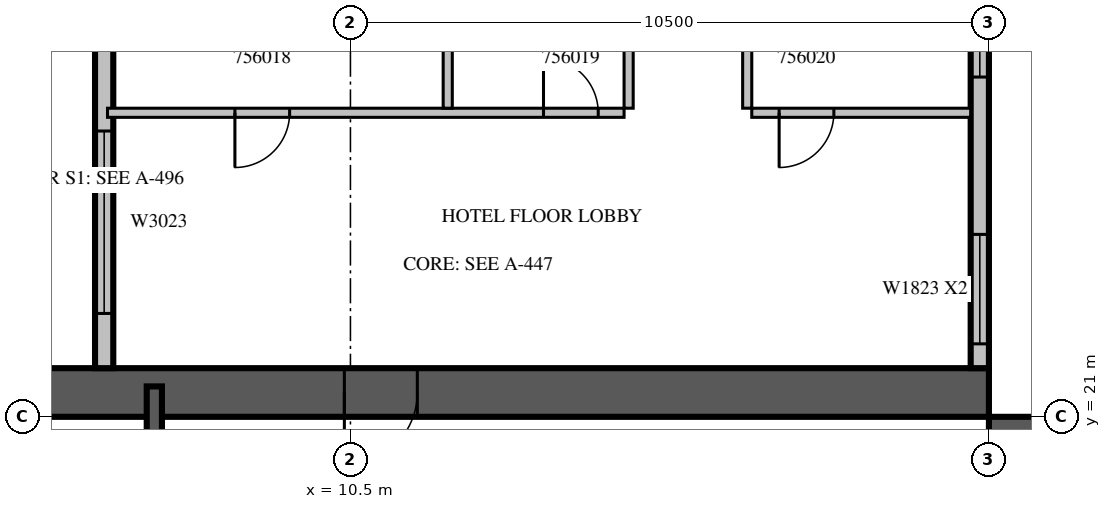
"""IFC4 building model, lengths in metres.
Left out: names, types, materials, properties, quantities, classifications, styles, units other than length and angle.
Written with IfcOpenShell. Run it as: python <this file> out.ifc"""

import sys

from ifc_helpers import new_model, si_unit, direction, frame, frame_2d, origin, place, context, subcontext, project, spatial, rectangle, extrude, source, transform, mapped, element, fill, save


model = new_model("IFC4")
c1 = context("Model", 3, precision=1e-05, world=origin(), true_north=direction((0.0, 1.0)))
c2 = subcontext(c1, "Body", "Model", "MODEL_VIEW")
j1 = project(units=[si_unit("LENGTHUNIT", "METRE"), si_unit("PLANEANGLEUNIT", "RADIAN")], contexts=[c1])
p1 = place(None, origin())
s1 = spatial("IfcSite", under=j1, at=p1, CompositionType="ELEMENT")
p2 = place(p1, origin())
s2 = spatial("IfcBuilding", under=s1, at=p2, CompositionType="ELEMENT")
p3 = place(p2, frame((0.0, 0.0, 246.2)))
s3 = spatial("IfcBuildingStorey", under=s2, at=p3, CompositionType="ELEMENT", Elevation=246.2)
m1 = source(origin(), c2, "Body", "SweptSolid", [
    extrude(rectangle(XDim=16.8, YDim=0.8, at=frame_2d((8.4, 0.0))), origin(), (0.0, 0.0, 1.0), 3.8),
])
p4 = place(p3, frame((21.4, 4.2, 0.0), z_axis=(0.0, 0.0, 1.0), x_axis=(0.0, 1.0, 0.0)))
e1 = element("IfcWall", 1, at=p4, inside=s3, PredefinedType="SHEAR", context=c2, shape_type="MappedRepresentation", body=[
    mapped(m1, transform((0.0, 0.0, 0.0), scale=1.0)),
])
m2 = source(origin(), c2, "Body", "SweptSolid", [
    extrude(rectangle(XDim=2.2, YDim=2.1, at=frame_2d((1.1, 1.05))), frame((0.0, 0.41, 0.0), z_axis=(0.0, -1.0, 0.0), x_axis=(1.0, 0.0, 0.0)), (0.0, 0.0, 1.0), 0.82),
])
p5 = place(p4, frame((4.2, 0.0, 0.0)))
e2 = element("IfcOpeningElement", 2, at=p5, cuts=e1, PredefinedType="OPENING", context=c2, shape_type="MappedRepresentation", body=[
    mapped(m2, transform((0.0, 0.0, 0.0), scale=1.0)),
])
m3 = source(origin(), c2, "Body", "SweptSolid", [
    extrude(rectangle(XDim=1.2, YDim=2.1, at=frame_2d((0.6, 1.05))), frame((0.0, 0.41, 0.0), z_axis=(0.0, -1.0, 0.0), x_axis=(1.0, 0.0, 0.0)), (0.0, 0.0, 1.0), 0.82),
])
p6 = place(p4, frame((14.7, 0.0, 0.0)))
e3 = element("IfcOpeningElement", 3, at=p6, cuts=e1, PredefinedType="OPENING", context=c2, shape_type="MappedRepresentation", body=[
    mapped(m3, transform((0.0, 0.0, 0.0), scale=1.0)),
])
p7 = place(p3, frame((4.2, 21.4, 0.0), z_axis=(0.0, 0.0, 1.0), x_axis=(1.0, 0.0, 0.0)))
e4 = element("IfcWall", 4, at=p7, inside=s3, PredefinedType="SHEAR", context=c2, shape_type="MappedRepresentation", body=[
    mapped(m1, transform((0.0, 0.0, 0.0), scale=1.0)),
])
p8 = place(p7, frame((6.2, 0.0, 0.0)))
e5 = element("IfcOpeningElement", 5, at=p8, cuts=e4, PredefinedType="OPENING", context=c2, shape_type="MappedRepresentation", body=[
    mapped(m3, transform((0.0, 0.0, 0.0), scale=1.0)),
])
m4 = source(origin(), c2, "Body", "SweptSolid", [
    extrude(rectangle(XDim=7.2, YDim=0.3, at=frame_2d((3.6, 0.0))), origin(), (0.0, 0.0, 1.0), 3.4),
])
p9 = place(p3, frame((20.85, 21.8, 0.0), z_axis=(0.0, 0.0, 1.0), x_axis=(0.0, 1.0, 0.0)))
e6 = element("IfcWall", 6, at=p9, inside=s3, PredefinedType="STANDARD", context=c2, shape_type="MappedRepresentation", body=[
    mapped(m4, transform((0.0, 0.0, 0.0), scale=1.0)),
])
m5 = source(origin(), c2, "Body", "SweptSolid", [
    extrude(rectangle(XDim=1.8, YDim=2.3, at=frame_2d((0.9, 1.15))), frame((0.0, 0.16, 0.0), z_axis=(0.0, -1.0, 0.0), x_axis=(1.0, 0.0, 0.0)), (0.0, 0.0, 1.0), 0.32),
])
p10 = place(p9, frame((0.4, 0.0, 0.6)))
e7 = element("IfcOpeningElement", 7, at=p10, cuts=e6, PredefinedType="OPENING", context=c2, shape_type="MappedRepresentation", body=[
    mapped(m5, transform((0.0, 0.0, 0.0), scale=1.0)),
])
p11 = place(p9, frame((4.787, 0.0, 0.6)))
e8 = element("IfcOpeningElement", 8, at=p11, cuts=e6, PredefinedType="OPENING", context=c2, shape_type="MappedRepresentation", body=[
    mapped(m5, transform((0.0, 0.0, 0.0), scale=1.0)),
])
m6 = source(origin(), c2, "Body", "SweptSolid", [
    extrude(rectangle(XDim=16.6, YDim=0.3, at=frame_2d((8.3, 0.0))), origin(), (0.0, 0.0, 1.0), 3.4),
])
p12 = place(p3, frame((6.45, 38.4, 0.0), z_axis=(0.0, 0.0, 1.0), x_axis=(0.0, -1.0, 0.0)))
e9 = element("IfcWall", 9, at=p12, inside=s3, PredefinedType="STANDARD", context=c2, shape_type="MappedRepresentation", body=[
    mapped(m6, transform((0.0, 0.0, 0.0), scale=1.0)),
])
p13 = place(p12, frame((1.15, 0.0, 0.6)))
e10 = element("IfcOpeningElement", 10, at=p13, cuts=e9, PredefinedType="OPENING", context=c2, shape_type="MappedRepresentation", body=[
    mapped(m5, transform((0.0, 0.0, 0.0), scale=1.0)),
])
p14 = place(p12, frame((9.438, 0.0, 0.6)))
e11 = element("IfcOpeningElement", 11, at=p14, cuts=e9, PredefinedType="OPENING", context=c2, shape_type="MappedRepresentation", body=[
    mapped(m5, transform((0.0, 0.0, 0.0), scale=1.0)),
])
m7 = source(origin(), c2, "Body", "SweptSolid", [
    extrude(rectangle(XDim=3.0, YDim=2.3, at=frame_2d((1.5, 1.15))), frame((0.0, 0.16, 0.0), z_axis=(0.0, -1.0, 0.0), x_axis=(1.0, 0.0, 0.0)), (0.0, 0.0, 1.0), 0.32),
])
p15 = place(p12, frame((12.7, 0.0, 0.6)))
e12 = element("IfcOpeningElement", 12, at=p15, cuts=e9, PredefinedType="OPENING", context=c2, shape_type="MappedRepresentation", body=[
    mapped(m7, transform((0.0, 0.0, 0.0), scale=1.0)),
])
m8 = source(origin(), c2, "Body", "SweptSolid", [
    extrude(rectangle(XDim=1.0, YDim=2.1, at=frame_2d((0.5, 1.05))), frame((0.0, 0.16, 0.0), z_axis=(0.0, -1.0, 0.0), x_axis=(1.0, 0.0, 0.0)), (0.0, 0.0, 1.0), 0.32),
])
p16 = place(p12, frame((5.45, 0.0, 0.0)))
e13 = element("IfcOpeningElement", 13, at=p16, cuts=e9, PredefinedType="OPENING", context=c2, shape_type="MappedRepresentation", body=[
    mapped(m8, transform((0.0, 0.0, 0.0), scale=1.0)),
])
m9 = source(origin(), c2, "Body", "SweptSolid", [
    extrude(rectangle(XDim=6.6, YDim=0.25, at=frame_2d((3.3, 0.0))), origin(), (0.0, 0.0, 1.0), 3.4),
])
p17 = place(p3, frame((7.275, 14.9, 0.0), z_axis=(0.0, 0.0, 1.0), x_axis=(0.0, 1.0, 0.0)))
e14 = element("IfcWall", 14, at=p17, inside=s3, PredefinedType="SOLIDWALL", context=c2, shape_type="MappedRepresentation", body=[
    mapped(m9, transform((0.0, 0.0, 0.0), scale=1.0)),
])
m10 = source(origin(), c2, "Body", "SweptSolid", [
    extrude(rectangle(XDim=1.1, YDim=2.1, at=frame_2d((0.55, 1.05))), frame((0.0, 0.135, 0.0), z_axis=(0.0, -1.0, 0.0), x_axis=(1.0, 0.0, 0.0)), (0.0, 0.0, 1.0), 0.27),
])
p18 = place(p17, frame((0.15, 0.0, 0.0)))
e15 = element("IfcOpeningElement", 15, at=p18, cuts=e14, PredefinedType="OPENING", context=c2, shape_type="MappedRepresentation", body=[
    mapped(m10, transform((0.0, 0.0, 0.0), scale=1.0)),
])
m11 = source(origin(), c2, "Body", "SweptSolid", [
    extrude(rectangle(XDim=8.495, YDim=0.15, at=frame_2d((4.247, 0.0))), origin(), (0.0, 0.0, 1.0), 3.4),
])
p19 = place(p3, frame((6.505, 26.0, 0.0), z_axis=(0.0, 0.0, 1.0), x_axis=(1.0, 0.0, 0.0)))
e16 = element("IfcWall", 16, at=p19, inside=s3, PredefinedType="PARTITIONING", context=c2, shape_type="MappedRepresentation", body=[
    mapped(m11, transform((0.0, 0.0, 0.0), scale=1.0)),
])
m12 = source(origin(), c2, "Body", "SweptSolid", [
    extrude(rectangle(XDim=0.9, YDim=2.1, at=frame_2d((0.45, 1.05))), frame((0.0, 0.085, 0.0), z_axis=(0.0, -1.0, 0.0), x_axis=(1.0, 0.0, 0.0)), (0.0, 0.0, 1.0), 0.17),
])
p20 = place(p19, frame((2.095, 0.0, 0.0)))
e17 = element("IfcOpeningElement", 17, at=p20, cuts=e16, PredefinedType="OPENING", context=c2, shape_type="MappedRepresentation", body=[
    mapped(m12, transform((0.0, 0.0, 0.0), scale=1.0)),
])
p21 = place(p19, frame((7.17, 0.0, 0.0)))
e18 = element("IfcOpeningElement", 18, at=p21, cuts=e16, PredefinedType="OPENING", context=c2, shape_type="MappedRepresentation", body=[
    mapped(m12, transform((0.0, 0.0, 0.0), scale=1.0)),
])
m13 = source(origin(), c2, "Body", "SweptSolid", [
    extrude(rectangle(XDim=3.6, YDim=0.15, at=frame_2d((1.8, 0.0))), origin(), (0.0, 0.0, 1.0), 3.4),
])
p22 = place(p3, frame((17.1, 26.0, 0.0), z_axis=(0.0, 0.0, 1.0), x_axis=(1.0, 0.0, 0.0)))
e19 = element("IfcWall", 19, at=p22, inside=s3, PredefinedType="PARTITIONING", context=c2, shape_type="MappedRepresentation", body=[
    mapped(m13, transform((0.0, 0.0, 0.0), scale=1.0)),
])
p23 = place(p22, frame((0.45, 0.0, 0.0)))
e20 = element("IfcOpeningElement", 20, at=p23, cuts=e19, PredefinedType="OPENING", context=c2, shape_type="MappedRepresentation", body=[
    mapped(m12, transform((0.0, 0.0, 0.0), scale=1.0)),
])
m14 = source(origin(), c2, "Body", "SweptSolid", [
    extrude(rectangle(XDim=3.25, YDim=0.15, at=frame_2d((1.625, 0.0))), origin(), (0.0, 0.0, 1.0), 3.4),
])
for number, where, z_axis, x_axis in (
    (21, (12.1, 26.075, 0.0), (0.0, 0.0, 1.0), (0.0, 1.0, 0.0)),
    (22, (15.075, 26.075, 0.0), (0.0, 0.0, 1.0), (0.0, 1.0, 0.0)),
    (23, (17.025, 29.325, 0.0), (0.0, 0.0, 1.0), (0.0, -1.0, 0.0)),
):
    element("IfcWall", number, at=place(p3, frame(where, z_axis=z_axis, x_axis=x_axis)), inside=s3, PredefinedType="PARTITIONING", context=c2, shape_type="MappedRepresentation", body=[
        mapped(m14, transform((0.0, 0.0, 0.0), scale=1.0)),
    ])
m15 = source(origin(), c2, "Body", "SweptSolid", [
    extrude(rectangle(XDim=1.8, YDim=2.3, at=frame_2d((0.9, 1.15))), frame((0.0, 0.03, 0.0), z_axis=(0.0, -1.0, 0.0), x_axis=(1.0, 0.0, 0.0)), (0.0, 0.0, 1.0), 0.06),
])
p24 = place(p10, origin())
e24 = element("IfcWindow", 24, at=p24, inside=s3, PartitioningType="SINGLE_PANEL", PredefinedType="WINDOW", context=c2, shape_type="MappedRepresentation", body=[
    mapped(m15, transform((0.0, 0.0, 0.0), scale=1.0)),
])
fill(e7, e24)
p25 = place(p11, origin())
e25 = element("IfcWindow", 25, at=p25, inside=s3, PartitioningType="SINGLE_PANEL", PredefinedType="WINDOW", context=c2, shape_type="MappedRepresentation", body=[
    mapped(m15, transform((0.0, 0.0, 0.0), scale=1.0)),
])
fill(e8, e25)
m16 = source(origin(), c2, "Body", "SweptSolid", [
    extrude(rectangle(XDim=3.0, YDim=2.3, at=frame_2d((1.5, 1.15))), frame((0.0, 0.03, 0.0), z_axis=(0.0, -1.0, 0.0), x_axis=(1.0, 0.0, 0.0)), (0.0, 0.0, 1.0), 0.06),
])
p26 = place(p15, origin())
e26 = element("IfcWindow", 26, at=p26, inside=s3, PartitioningType="SINGLE_PANEL", PredefinedType="WINDOW", context=c2, shape_type="MappedRepresentation", body=[
    mapped(m16, transform((0.0, 0.0, 0.0), scale=1.0)),
])
fill(e12, e26)
m17 = source(origin(), c2, "Body", "SweptSolid", [
    extrude(rectangle(XDim=1.2, YDim=2.1, at=frame_2d((0.6, 1.05))), frame((0.0, 0.025, 0.0), z_axis=(0.0, -1.0, 0.0), x_axis=(1.0, 0.0, 0.0)), (0.0, 0.0, 1.0), 0.05),
])
p27 = place(p8, origin())
e27 = element("IfcDoor", 27, at=p27, inside=s3, OperationType="SINGLE_SWING_RIGHT", PredefinedType="DOOR", context=c2, shape_type="MappedRepresentation", body=[
    mapped(m17, transform((0.0, 0.0, 0.0), scale=1.0)),
])
fill(e5, e27)
m18 = source(origin(), c2, "Body", "SweptSolid", [
    extrude(rectangle(XDim=0.9, YDim=2.1, at=frame_2d((0.45, 1.05))), frame((0.0, 0.025, 0.0), z_axis=(0.0, -1.0, 0.0), x_axis=(1.0, 0.0, 0.0)), (0.0, 0.0, 1.0), 0.05),
])
p28 = place(p20, origin())
e28 = element("IfcDoor", 28, at=p28, inside=s3, OperationType="SINGLE_SWING_RIGHT", PredefinedType="DOOR", context=c2, shape_type="MappedRepresentation", body=[
    mapped(m18, transform((0.0, 0.0, 0.0), scale=1.0)),
])
fill(e17, e28)
p29 = place(p21, origin())
e29 = element("IfcDoor", 29, at=p29, inside=s3, OperationType="SINGLE_SWING_LEFT", PredefinedType="DOOR", context=c2, shape_type="MappedRepresentation", body=[
    mapped(m18, transform((0.0, 0.0, 0.0), scale=1.0)),
])
fill(e18, e29)
p30 = place(p23, origin())
e30 = element("IfcDoor", 30, at=p30, inside=s3, OperationType="SINGLE_SWING_RIGHT", PredefinedType="DOOR", context=c2, shape_type="MappedRepresentation", body=[
    mapped(m18, transform((0.0, 0.0, 0.0), scale=1.0)),
])
fill(e20, e30)
save(model, sys.argv[1])
